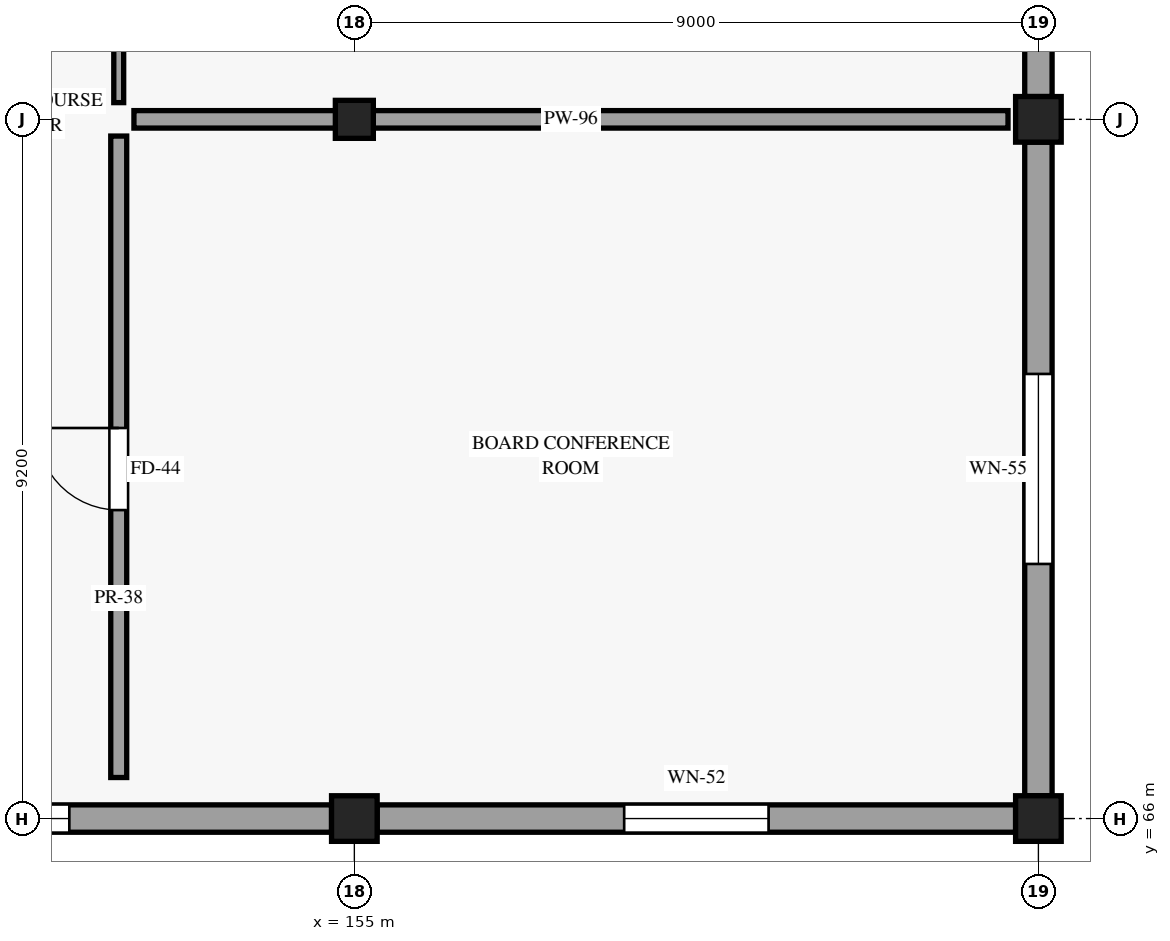
"""IFC4 building model, lengths in metres.
Left out: names, types, materials, properties, quantities, classifications, styles, units other than length and angle.
Written with IfcOpenShell. Run it as: python <this file> out.ifc"""

import sys

from ifc_helpers import new_model, si_unit, direction, frame, frame_2d, origin, origin_2d, place, context, subcontext, project, spatial, rectangle, extrude, element, fill, save


model = new_model("IFC4")
c1 = context("Model", 3, precision=1e-05, world=origin(), true_north=direction((0.0, 1.0)))
c2 = subcontext(c1, "Body", "Model", "MODEL_VIEW")
j1 = project(units=[si_unit("LENGTHUNIT", "METRE"), si_unit("PLANEANGLEUNIT", "RADIAN")], contexts=[c1])
p1 = place(None, origin())
s1 = spatial("IfcSite", under=j1, at=p1, CompositionType="ELEMENT")
p2 = place(p1, origin())
s2 = spatial("IfcBuilding", under=s1, at=p2, CompositionType="ELEMENT")
p3 = place(p2, frame((0.0, 0.0, 15.0)))
s3 = spatial("IfcBuildingStorey", under=s2, at=p3, CompositionType="ELEMENT", Elevation=15.0)
p4 = place(p3, frame((155.0, 66.0, 0.0), z_axis=(0.0, 0.0, 1.0), x_axis=(1.0, 0.0, 0.0)))
e1 = element("IfcColumn", 1, at=p4, inside=s3, PredefinedType="COLUMN", context=c2, shape_type="SweptSolid", body=[
    extrude(rectangle(XDim=0.6, YDim=0.6, at=origin_2d()), origin(), (0.0, 0.0, 1.0), 4.5),
])
p5 = place(p3, frame((155.0, 75.2, 0.0), z_axis=(0.0, 0.0, 1.0), x_axis=(1.0, 0.0, 0.0)))
e2 = element("IfcColumn", 2, at=p5, inside=s3, PredefinedType="COLUMN", context=c2, shape_type="SweptSolid", body=[
    extrude(rectangle(XDim=0.5, YDim=0.5, at=origin_2d()), origin(), (0.0, 0.0, 1.0), 4.5),
])
for number, where, z_axis, x_axis in (
    (3, (164.0, 66.0, 0.0), (0.0, 0.0, 1.0), (1.0, 0.0, 0.0)),
    (4, (164.0, 75.2, 0.0), (0.0, 0.0, 1.0), (1.0, 0.0, 0.0)),
):
    element("IfcColumn", number, at=place(p3, frame(where, z_axis=z_axis, x_axis=x_axis)), inside=s3, PredefinedType="COLUMN", context=c2, shape_type="SweptSolid", body=[
        extrude(rectangle(XDim=0.6, YDim=0.6, at=origin_2d()), origin(), (0.0, 0.0, 1.0), 4.5),
    ])
p6 = place(p3, frame((146.3, 66.0, 0.0), z_axis=(0.0, 0.0, 1.0), x_axis=(1.0, 0.0, 0.0)))
e5 = element("IfcWall", 5, at=p6, inside=s3, PredefinedType="STANDARD", context=c2, shape_type="SweptSolid", body=[
    extrude(rectangle(XDim=8.4, YDim=0.36, at=frame_2d((4.2, 0.0))), origin(), (0.0, 0.0, 1.0), 3.725),
])
p7 = place(p6, frame((4.95, 0.0, 0.85), z_axis=(0.0, 0.0, 1.0), x_axis=(-1.0, 0.0, 0.0)))
e6 = element("IfcOpeningElement", 6, at=p7, cuts=e5, PredefinedType="OPENING", context=c2, shape_type="SweptSolid", body=[
    extrude(rectangle(XDim=1.5, YDim=2.2, at=frame_2d((0.75, 1.1))), frame((0.0, 0.19, 0.0), z_axis=(0.0, -1.0, 0.0), x_axis=(1.0, 0.0, 0.0)), (0.0, 0.0, 1.0), 0.38),
])
p8 = place(p3, frame((155.3, 66.0, 0.0), z_axis=(0.0, 0.0, 1.0), x_axis=(1.0, 0.0, 0.0)))
e7 = element("IfcWall", 7, at=p8, inside=s3, PredefinedType="STANDARD", context=c2, shape_type="SweptSolid", body=[
    extrude(rectangle(XDim=8.4, YDim=0.36, at=frame_2d((4.2, 0.0))), origin(), (0.0, 0.0, 1.0), 3.725),
])
p9 = place(p8, frame((5.15, 0.0, 0.85), z_axis=(0.0, 0.0, 1.0), x_axis=(-1.0, 0.0, 0.0)))
e8 = element("IfcOpeningElement", 8, at=p9, cuts=e7, PredefinedType="OPENING", context=c2, shape_type="SweptSolid", body=[
    extrude(rectangle(XDim=1.9, YDim=2.4, at=frame_2d((0.95, 1.2))), frame((0.0, 0.19, 0.0), z_axis=(0.0, -1.0, 0.0), x_axis=(1.0, 0.0, 0.0)), (0.0, 0.0, 1.0), 0.38),
])
p10 = place(p3, frame((164.0, 66.3, 0.0), z_axis=(0.0, 0.0, 1.0), x_axis=(0.0, 1.0, 0.0)))
e9 = element("IfcWall", 9, at=p10, inside=s3, PredefinedType="STANDARD", context=c2, shape_type="SweptSolid", body=[
    extrude(rectangle(XDim=8.6, YDim=0.36, at=frame_2d((4.3, 0.0))), origin(), (0.0, 0.0, 1.0), 3.725),
])
p11 = place(p10, frame((5.55, 0.0, 0.85), z_axis=(0.0, 0.0, 1.0), x_axis=(-1.0, 0.0, 0.0)))
e10 = element("IfcOpeningElement", 10, at=p11, cuts=e9, PredefinedType="OPENING", context=c2, shape_type="SweptSolid", body=[
    extrude(rectangle(XDim=2.5, YDim=2.15, at=frame_2d((1.25, 1.075))), frame((0.0, 0.19, 0.0), z_axis=(0.0, -1.0, 0.0), x_axis=(1.0, 0.0, 0.0)), (0.0, 0.0, 1.0), 0.38),
])
p12 = place(p3, frame((164.0, 75.5, 0.0), z_axis=(0.0, 0.0, 1.0), x_axis=(0.0, 1.0, 0.0)))
e11 = element("IfcWall", 11, at=p12, inside=s3, PredefinedType="STANDARD", context=c2, shape_type="SweptSolid", body=[
    extrude(rectangle(XDim=8.6, YDim=0.36, at=frame_2d((4.3, 0.0))), origin(), (0.0, 0.0, 1.0), 3.725),
])
p13 = place(p12, frame((5.75, 0.0, 0.85), z_axis=(0.0, 0.0, 1.0), x_axis=(-1.0, 0.0, 0.0)))
e12 = element("IfcOpeningElement", 12, at=p13, cuts=e11, PredefinedType="OPENING", context=c2, shape_type="SweptSolid", body=[
    extrude(rectangle(XDim=2.9, YDim=2.25, at=frame_2d((1.45, 1.125))), frame((0.0, 0.19, 0.0), z_axis=(0.0, -1.0, 0.0), x_axis=(1.0, 0.0, 0.0)), (0.0, 0.0, 1.0), 0.38),
])
p14 = place(p3, frame((151.9, 66.54, 0.0), z_axis=(0.0, 0.0, 1.0), x_axis=(0.0, 1.0, 0.0)))
e13 = element("IfcWall", 13, at=p14, inside=s3, PredefinedType="PARTITIONING", context=c2, shape_type="SweptSolid", body=[
    extrude(rectangle(XDim=8.44, YDim=0.21, at=frame_2d((4.22, 0.0))), origin(), (0.0, 0.0, 1.0), 3.725),
])
p15 = place(p14, frame((3.519, 0.0, 0.0)))
e14 = element("IfcOpeningElement", 14, at=p15, cuts=e13, PredefinedType="OPENING", context=c2, shape_type="SweptSolid", body=[
    extrude(rectangle(XDim=1.08, YDim=2.24, at=frame_2d((0.54, 1.12))), frame((0.0, 0.115, 0.0), z_axis=(0.0, -1.0, 0.0), x_axis=(1.0, 0.0, 0.0)), (0.0, 0.0, 1.0), 0.23),
])
p16 = place(p3, frame((152.1, 75.2, 0.0), z_axis=(0.0, 0.0, 1.0), x_axis=(1.0, 0.0, 0.0)))
e15 = element("IfcWall", 15, at=p16, inside=s3, PredefinedType="PARTITIONING", context=c2, shape_type="SweptSolid", body=[
    extrude(rectangle(XDim=11.5, YDim=0.23, at=frame_2d((5.75, 0.0))), origin(), (0.0, 0.0, 1.0), 3.725),
])
p17 = place(p3, frame((151.9, 75.42, 0.0), z_axis=(0.0, 0.0, 1.0), x_axis=(0.0, 1.0, 0.0)))
e16 = element("IfcWall", 16, at=p17, inside=s3, PredefinedType="PARTITIONING", context=c2, shape_type="SweptSolid", body=[
    extrude(rectangle(XDim=8.76, YDim=0.13, at=frame_2d((4.38, 0.0))), origin(), (0.0, 0.0, 1.0), 3.725),
])
p18 = place(p17, frame((3.88, 0.0, 0.0)))
e17 = element("IfcOpeningElement", 17, at=p18, cuts=e16, PredefinedType="OPENING", context=c2, shape_type="SweptSolid", body=[
    extrude(rectangle(XDim=1.16, YDim=2.28, at=frame_2d((0.58, 1.14))), frame((0.0, 0.075, 0.0), z_axis=(0.0, -1.0, 0.0), x_axis=(1.0, 0.0, 0.0)), (0.0, 0.0, 1.0), 0.15),
])
p19 = place(p7, origin())
e18 = element("IfcWindow", 18, at=p19, inside=s3, PartitioningType="SINGLE_PANEL", PredefinedType="WINDOW", context=c2, shape_type="SweptSolid", body=[
    extrude(rectangle(XDim=1.5, YDim=2.2, at=frame_2d((0.75, 1.1))), frame((0.0, 0.03, 0.0), z_axis=(0.0, -1.0, 0.0), x_axis=(1.0, 0.0, 0.0)), (0.0, 0.0, 1.0), 0.06),
])
fill(e6, e18)
p20 = place(p9, origin())
e19 = element("IfcWindow", 19, at=p20, inside=s3, PartitioningType="SINGLE_PANEL", PredefinedType="WINDOW", context=c2, shape_type="SweptSolid", body=[
    extrude(rectangle(XDim=1.9, YDim=2.4, at=frame_2d((0.95, 1.2))), frame((0.0, 0.03, 0.0), z_axis=(0.0, -1.0, 0.0), x_axis=(1.0, 0.0, 0.0)), (0.0, 0.0, 1.0), 0.06),
])
fill(e8, e19)
p21 = place(p11, origin())
e20 = element("IfcWindow", 20, at=p21, inside=s3, PartitioningType="SINGLE_PANEL", PredefinedType="WINDOW", context=c2, shape_type="SweptSolid", body=[
    extrude(rectangle(XDim=2.5, YDim=2.15, at=frame_2d((1.25, 1.075))), frame((0.0, 0.03, 0.0), z_axis=(0.0, -1.0, 0.0), x_axis=(1.0, 0.0, 0.0)), (0.0, 0.0, 1.0), 0.06),
])
fill(e10, e20)
p22 = place(p15, origin())
e21 = element("IfcDoor", 21, at=p22, inside=s3, OperationType="SINGLE_SWING_RIGHT", PredefinedType="DOOR", context=c2, shape_type="SweptSolid", body=[
    extrude(rectangle(XDim=1.08, YDim=2.24, at=frame_2d((0.54, 1.12))), frame((0.0, 0.025, 0.0), z_axis=(0.0, -1.0, 0.0), x_axis=(1.0, 0.0, 0.0)), (0.0, 0.0, 1.0), 0.05),
])
fill(e14, e21)
save(model, sys.argv[1])
